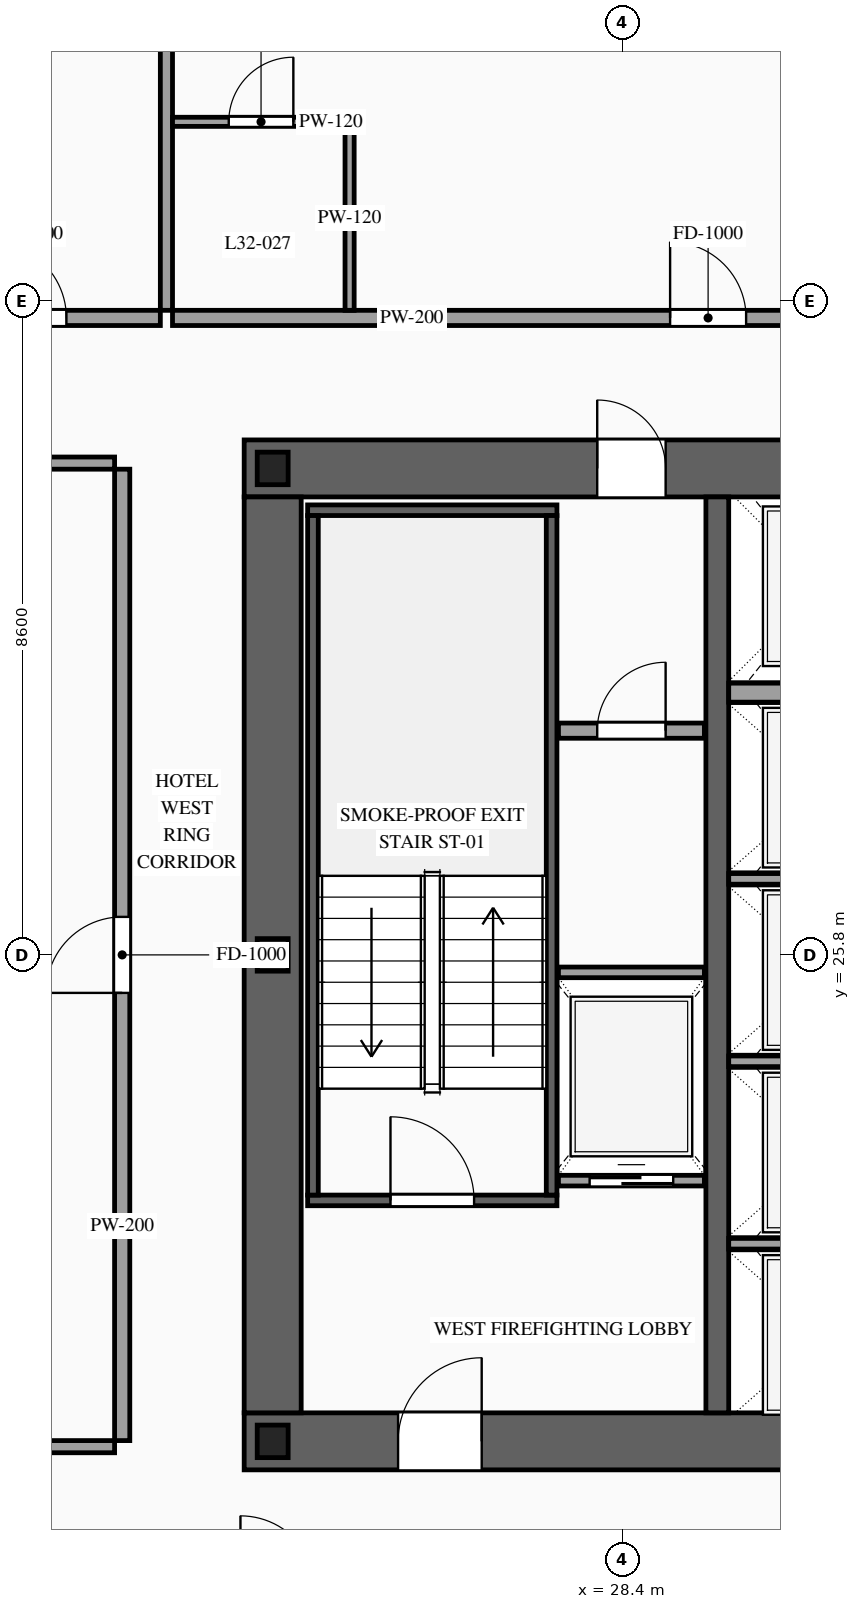
"""IFC4 building model, lengths in metres.
Left out: names, types, materials, properties, quantities, classifications, styles, units other than length and angle.
Written with IfcOpenShell. Run it as: python <this file> out.ifc"""

import sys

from ifc_helpers import new_model, si_unit, direction, frame, frame_2d, origin, origin_2d, place, context, subcontext, project, spatial, rectangle, i_section, extrude, source, transform, mapped, element, fill, save


model = new_model("IFC4")
c1 = context("Model", 3, precision=1e-05, world=origin(), true_north=direction((0.0, 1.0)))
c2 = subcontext(c1, "Body", "Model", "MODEL_VIEW")
j1 = project(units=[si_unit("LENGTHUNIT", "METRE"), si_unit("PLANEANGLEUNIT", "RADIAN")], contexts=[c1])
p1 = place(None, origin())
s1 = spatial("IfcSite", under=j1, at=p1, CompositionType="ELEMENT")
p2 = place(p1, origin())
s2 = spatial("IfcBuilding", under=s1, at=p2, CompositionType="ELEMENT")
p3 = place(p2, frame((0.0, 0.0, 122.6)))
s3 = spatial("IfcBuildingStorey", under=s2, at=p3, CompositionType="ELEMENT", Elevation=122.6)
p4 = place(p3, frame((23.425, 19.4, 0.0), z_axis=(0.0, 0.0, 1.0), x_axis=(1.0, 0.0, 0.0)))
e1 = element("IfcWall", 1, at=p4, inside=s3, PredefinedType="SHEAR", context=c2, shape_type="SweptSolid", body=[
    extrude(rectangle(XDim=27.15, YDim=0.75, at=frame_2d((13.575, 0.0))), origin(), (0.0, 0.0, 1.0), 3.6),
])
p5 = place(p4, frame((2.025, 0.0, 0.0)))
e2 = element("IfcOpeningElement", 2, at=p5, cuts=e1, PredefinedType="OPENING", context=c2, shape_type="SweptSolid", body=[
    extrude(rectangle(XDim=1.1, YDim=2.2, at=frame_2d((0.55, 1.1))), frame((0.0, 0.39, 0.0), z_axis=(0.0, -1.0, 0.0), x_axis=(1.0, 0.0, 0.0)), (0.0, 0.0, 1.0), 0.78),
])
p6 = place(p4, frame((9.925, 0.0, 0.0)))
e3 = element("IfcOpeningElement", 3, at=p6, cuts=e1, PredefinedType="OPENING", context=c2, shape_type="SweptSolid", body=[
    extrude(rectangle(XDim=1.1, YDim=2.2, at=frame_2d((0.55, 1.1))), frame((0.0, 0.39, 0.0), z_axis=(0.0, -1.0, 0.0), x_axis=(1.0, 0.0, 0.0)), (0.0, 0.0, 1.0), 0.78),
])
p7 = place(p4, frame((23.125, 0.0, 0.0)))
e4 = element("IfcOpeningElement", 4, at=p7, cuts=e1, PredefinedType="OPENING", context=c2, shape_type="SweptSolid", body=[
    extrude(rectangle(XDim=1.1, YDim=2.2, at=frame_2d((0.55, 1.1))), frame((0.0, 0.39, 0.0), z_axis=(0.0, -1.0, 0.0), x_axis=(1.0, 0.0, 0.0)), (0.0, 0.0, 1.0), 0.78),
])
p8 = place(p4, frame((19.745, 0.0, 0.0)))
e5 = element("IfcOpeningElement", 5, at=p8, cuts=e1, PredefinedType="OPENING", context=c2, shape_type="SweptSolid", body=[
    extrude(rectangle(XDim=0.9, YDim=2.15, at=frame_2d((0.45, 1.075))), frame((0.0, 0.39, 0.0), z_axis=(0.0, -1.0, 0.0), x_axis=(1.0, 0.0, 0.0)), (0.0, 0.0, 1.0), 0.78),
])
p9 = place(p4, frame((18.305, 0.0, 0.0)))
e6 = element("IfcOpeningElement", 6, at=p9, cuts=e1, PredefinedType="OPENING", context=c2, shape_type="SweptSolid", body=[
    extrude(rectangle(XDim=0.9, YDim=2.15, at=frame_2d((0.45, 1.075))), frame((0.0, 0.39, 0.0), z_axis=(0.0, -1.0, 0.0), x_axis=(1.0, 0.0, 0.0)), (0.0, 0.0, 1.0), 0.78),
])
p10 = place(p3, frame((23.425, 32.2, 0.0), z_axis=(0.0, 0.0, 1.0), x_axis=(1.0, 0.0, 0.0)))
e7 = element("IfcWall", 7, at=p10, inside=s3, PredefinedType="SHEAR", context=c2, shape_type="SweptSolid", body=[
    extrude(rectangle(XDim=27.15, YDim=0.75, at=frame_2d((13.575, 0.0))), origin(), (0.0, 0.0, 1.0), 3.6),
])
p11 = place(p10, frame((4.645, 0.0, 0.0)))
e8 = element("IfcOpeningElement", 8, at=p11, cuts=e7, PredefinedType="OPENING", context=c2, shape_type="SweptSolid", body=[
    extrude(rectangle(XDim=0.9, YDim=2.15, at=frame_2d((0.45, 1.075))), frame((0.0, 0.39, 0.0), z_axis=(0.0, -1.0, 0.0), x_axis=(1.0, 0.0, 0.0)), (0.0, 0.0, 1.0), 0.78),
])
p12 = place(p10, frame((9.925, 0.0, 0.0)))
e9 = element("IfcOpeningElement", 9, at=p12, cuts=e7, PredefinedType="OPENING", context=c2, shape_type="SweptSolid", body=[
    extrude(rectangle(XDim=1.1, YDim=2.2, at=frame_2d((0.55, 1.1))), frame((0.0, 0.39, 0.0), z_axis=(0.0, -1.0, 0.0), x_axis=(1.0, 0.0, 0.0)), (0.0, 0.0, 1.0), 0.78),
])
p13 = place(p10, frame((15.775, 0.0, 0.0)))
e10 = element("IfcOpeningElement", 10, at=p13, cuts=e7, PredefinedType="OPENING", context=c2, shape_type="SweptSolid", body=[
    extrude(rectangle(XDim=1.1, YDim=2.2, at=frame_2d((0.55, 1.1))), frame((0.0, 0.39, 0.0), z_axis=(0.0, -1.0, 0.0), x_axis=(1.0, 0.0, 0.0)), (0.0, 0.0, 1.0), 0.78),
])
m1 = source(origin(), c2, "Body", "SweptSolid", [
    extrude(rectangle(XDim=12.05, YDim=0.75, at=frame_2d((6.025, 0.0))), origin(), (0.0, 0.0, 1.0), 3.6),
])
p14 = place(p3, frame((23.8, 19.775, 0.0), z_axis=(0.0, 0.0, 1.0), x_axis=(0.0, 1.0, 0.0)))
e11 = element("IfcWall", 11, at=p14, inside=s3, PredefinedType="SHEAR", context=c2, shape_type="MappedRepresentation", body=[
    mapped(m1, transform((0.0, 0.0, 0.0), scale=1.0)),
])
m2 = source(origin(), c2, "Body", "SweptSolid", [
    extrude(rectangle(XDim=12.05, YDim=0.3, at=frame_2d((6.025, 0.0))), origin(), (0.0, 0.0, 1.0), 3.6),
])
p15 = place(p3, frame((29.65, 19.775, 0.0), z_axis=(0.0, 0.0, 1.0), x_axis=(0.0, 1.0, 0.0)))
e12 = element("IfcWall", 12, at=p15, inside=s3, PredefinedType="SOLIDWALL", context=c2, shape_type="MappedRepresentation", body=[
    mapped(m2, transform((0.0, 0.0, 0.0), scale=1.0)),
])
m3 = source(origin(), c2, "Body", "SweptSolid", [
    extrude(i_section(OverallWidth=0.407, OverallDepth=0.428, WebThickness=0.02, FlangeThickness=0.035, at=origin_2d()), origin(), (0.0, 0.0, 1.0), 3.6),
])
for number, where, z_axis, x_axis in (
    (13, (23.8, 19.4, 0.0), (0.0, 0.0, 1.0), (1.0, 0.0, 0.0)),
    (14, (23.8, 25.8, 0.0), (0.0, 0.0, 1.0), (1.0, 0.0, 0.0)),
    (15, (23.8, 32.2, 0.0), (0.0, 0.0, 1.0), (1.0, 0.0, 0.0)),
):
    element("IfcColumn", number, at=place(p3, frame(where, z_axis=z_axis, x_axis=x_axis)), inside=s3, PredefinedType="COLUMN", context=c2, shape_type="MappedRepresentation", body=[
        mapped(m3, transform((0.0, 0.0, 0.0), scale=1.0)),
    ])
p16 = place(p3, frame((27.56, 22.83, 0.0), z_axis=(0.0, 0.0, 1.0), x_axis=(1.0, 0.0, 0.0)))
e16 = element("IfcWall", 16, at=p16, inside=s3, PredefinedType="SOLIDWALL", context=c2, shape_type="SweptSolid", body=[
    extrude(rectangle(XDim=1.92, YDim=0.14, at=frame_2d((0.96, 0.0))), origin(), (0.0, 0.0, 1.0), 3.38),
])
p17 = place(p16, frame((0.41, 0.0, 0.0)))
e17 = element("IfcOpeningElement", 17, at=p17, cuts=e16, PredefinedType="OPENING", context=c2, shape_type="SweptSolid", body=[
    extrude(rectangle(XDim=1.1, YDim=2.2, at=frame_2d((0.55, 1.1))), frame((0.0, 0.085, 0.0), z_axis=(0.0, -1.0, 0.0), x_axis=(1.0, 0.0, 0.0)), (0.0, 0.0, 1.0), 0.17),
])
m4 = source(origin(), c2, "Body", "SweptSolid", [
    extrude(rectangle(XDim=1.92, YDim=0.14, at=frame_2d((0.96, 0.0))), origin(), (0.0, 0.0, 1.0), 3.38),
])
p18 = place(p3, frame((27.56, 25.57, 0.0), z_axis=(0.0, 0.0, 1.0), x_axis=(1.0, 0.0, 0.0)))
e18 = element("IfcWall", 18, at=p18, inside=s3, PredefinedType="SOLIDWALL", context=c2, shape_type="MappedRepresentation", body=[
    mapped(m4, transform((0.0, 0.0, 0.0), scale=1.0)),
])
m5 = source(origin(), c2, "Body", "SweptSolid", [
    extrude(rectangle(XDim=2.5, YDim=0.14, at=frame_2d((1.25, 0.0))), origin(), (0.0, 0.0, 1.0), 3.38),
])
for number, where, z_axis, x_axis in (
    (19, (29.8, 22.0, 0.0), (0.0, 0.0, 1.0), (1.0, 0.0, 0.0)),
    (20, (29.8, 24.4, 0.0), (0.0, 0.0, 1.0), (1.0, 0.0, 0.0)),
    (21, (29.8, 26.8, 0.0), (0.0, 0.0, 1.0), (1.0, 0.0, 0.0)),
):
    element("IfcWall", number, at=place(p3, frame(where, z_axis=z_axis, x_axis=x_axis)), inside=s3, PredefinedType="SOLIDWALL", context=c2, shape_type="MappedRepresentation", body=[
        mapped(m5, transform((0.0, 0.0, 0.0), scale=1.0)),
    ])
m6 = source(origin(), c2, "Body", "SweptSolid", [
    extrude(rectangle(XDim=2.5, YDim=0.25, at=frame_2d((1.25, 0.0))), origin(), (0.0, 0.0, 1.0), 3.38),
])
p19 = place(p3, frame((29.8, 29.25, 0.0), z_axis=(0.0, 0.0, 1.0), x_axis=(1.0, 0.0, 0.0)))
e22 = element("IfcWall", 22, at=p19, inside=s3, PredefinedType="SOLIDWALL", context=c2, shape_type="MappedRepresentation", body=[
    mapped(m6, transform((0.0, 0.0, 0.0), scale=1.0)),
])
p20 = place(p3, frame((24.26, 22.57, 0.0), z_axis=(0.0, 0.0, 1.0), x_axis=(1.0, 0.0, 0.0)))
e23 = element("IfcWall", 23, at=p20, inside=s3, PredefinedType="SOLIDWALL", context=c2, shape_type="SweptSolid", body=[
    extrude(rectangle(XDim=3.28, YDim=0.14, at=frame_2d((1.64, 0.0))), origin(), (0.0, 0.0, 1.0), 3.38),
])
p21 = place(p20, frame((1.09, 0.0, 0.0)))
e24 = element("IfcOpeningElement", 24, at=p21, cuts=e23, PredefinedType="OPENING", context=c2, shape_type="SweptSolid", body=[
    extrude(rectangle(XDim=1.1, YDim=2.2, at=frame_2d((0.55, 1.1))), frame((0.0, 0.085, 0.0), z_axis=(0.0, -1.0, 0.0), x_axis=(1.0, 0.0, 0.0)), (0.0, 0.0, 1.0), 0.17),
])
m7 = source(origin(), c2, "Body", "SweptSolid", [
    extrude(rectangle(XDim=3.28, YDim=0.14, at=frame_2d((1.64, 0.0))), origin(), (0.0, 0.0, 1.0), 3.38),
])
p22 = place(p3, frame((24.26, 31.65, 0.0), z_axis=(0.0, 0.0, 1.0), x_axis=(1.0, 0.0, 0.0)))
e25 = element("IfcWall", 25, at=p22, inside=s3, PredefinedType="SOLIDWALL", context=c2, shape_type="MappedRepresentation", body=[
    mapped(m7, transform((0.0, 0.0, 0.0), scale=1.0)),
])
m8 = source(origin(), c2, "Body", "SweptSolid", [
    extrude(rectangle(XDim=8.94, YDim=0.14, at=frame_2d((4.47, 0.0))), origin(), (0.0, 0.0, 1.0), 3.38),
])
for number, where, z_axis, x_axis in (
    (26, (24.33, 22.64, 0.0), (0.0, 0.0, 1.0), (0.0, 1.0, 0.0)),
    (27, (27.47, 22.64, 0.0), (0.0, 0.0, 1.0), (0.0, 1.0, 0.0)),
):
    element("IfcWall", number, at=place(p3, frame(where, z_axis=z_axis, x_axis=x_axis)), inside=s3, PredefinedType="SOLIDWALL", context=c2, shape_type="MappedRepresentation", body=[
        mapped(m8, transform((0.0, 0.0, 0.0), scale=1.0)),
    ])
p23 = place(p3, frame((27.56, 28.75, 0.0), z_axis=(0.0, 0.0, 1.0), x_axis=(1.0, 0.0, 0.0)))
e28 = element("IfcWall", 28, at=p23, inside=s3, PredefinedType="PARTITIONING", context=c2, shape_type="SweptSolid", body=[
    extrude(rectangle(XDim=1.92, YDim=0.2, at=frame_2d((0.96, 0.0))), origin(), (0.0, 0.0, 1.0), 3.38),
])
p24 = place(p23, frame((0.51, 0.0, 0.0)))
e29 = element("IfcOpeningElement", 29, at=p24, cuts=e28, PredefinedType="OPENING", context=c2, shape_type="SweptSolid", body=[
    extrude(rectangle(XDim=0.9, YDim=2.15, at=frame_2d((0.45, 1.075))), frame((0.0, 0.115, 0.0), z_axis=(0.0, -1.0, 0.0), x_axis=(1.0, 0.0, 0.0)), (0.0, 0.0, 1.0), 0.23),
])
p25 = place(p3, frame((16.44, 34.18, 0.0), z_axis=(0.0, 0.0, 1.0), x_axis=(1.0, 0.0, 0.0)))
e30 = element("IfcWall", 30, at=p25, inside=s3, PredefinedType="PARTITIONING", context=c2, shape_type="SweptSolid", body=[
    extrude(rectangle(XDim=5.882, YDim=0.2, at=frame_2d((2.941, 0.0))), origin(), (0.0, 0.0, 1.0), 3.38),
])
p26 = place(p25, frame((3.646, 0.0, 0.0)))
e31 = element("IfcOpeningElement", 31, at=p26, cuts=e30, PredefinedType="OPENING", context=c2, shape_type="SweptSolid", body=[
    extrude(rectangle(XDim=1.0, YDim=2.2, at=frame_2d((0.5, 1.1))), frame((0.0, 0.115, 0.0), z_axis=(0.0, -1.0, 0.0), x_axis=(1.0, 0.0, 0.0)), (0.0, 0.0, 1.0), 0.23),
])
m9 = source(origin(), c2, "Body", "SweptSolid", [
    extrude(rectangle(XDim=14.97, YDim=0.16, at=frame_2d((7.485, 0.0))), origin(), (0.0, 0.0, 1.0), 3.38),
])
p27 = place(p3, frame((22.402, 34.28, 0.0), z_axis=(0.0, 0.0, 1.0), x_axis=(0.0, 1.0, 0.0)))
e32 = element("IfcWall", 32, at=p27, inside=s3, PredefinedType="PARTITIONING", context=c2, shape_type="MappedRepresentation", body=[
    mapped(m9, transform((0.0, 0.0, 0.0), scale=1.0)),
])
p28 = place(p3, frame((22.482, 34.18, 0.0), z_axis=(0.0, 0.0, 1.0), x_axis=(1.0, 0.0, 0.0)))
e33 = element("IfcWall", 33, at=p28, inside=s3, PredefinedType="PARTITIONING", context=c2, shape_type="SweptSolid", body=[
    extrude(rectangle(XDim=11.683, YDim=0.2, at=frame_2d((5.842, 0.0))), origin(), (0.0, 0.0, 1.0), 3.38),
])
p29 = place(p28, frame((6.547, 0.0, 0.0)))
e34 = element("IfcOpeningElement", 34, at=p29, cuts=e33, PredefinedType="OPENING", context=c2, shape_type="SweptSolid", body=[
    extrude(rectangle(XDim=1.0, YDim=2.2, at=frame_2d((0.5, 1.1))), frame((0.0, 0.115, 0.0), z_axis=(0.0, -1.0, 0.0), x_axis=(1.0, 0.0, 0.0)), (0.0, 0.0, 1.0), 0.23),
])
p30 = place(p3, frame((22.482, 36.76, 0.0), z_axis=(0.0, 0.0, 1.0), x_axis=(1.0, 0.0, 0.0)))
e35 = element("IfcWall", 35, at=p30, inside=s3, PredefinedType="PARTITIONING", context=c2, shape_type="SweptSolid", body=[
    extrude(rectangle(XDim=2.33, YDim=0.12, at=frame_2d((1.165, 0.0))), origin(), (0.0, 0.0, 1.0), 3.38),
])
p31 = place(p30, frame((0.74, 0.0, 0.0)))
e36 = element("IfcOpeningElement", 36, at=p31, cuts=e35, PredefinedType="OPENING", context=c2, shape_type="SweptSolid", body=[
    extrude(rectangle(XDim=0.85, YDim=2.1, at=frame_2d((0.425, 1.05))), frame((0.0, 0.075, 0.0), z_axis=(0.0, -1.0, 0.0), x_axis=(1.0, 0.0, 0.0)), (0.0, 0.0, 1.0), 0.15),
])
m10 = source(origin(), c2, "Body", "SweptSolid", [
    extrude(rectangle(XDim=2.42, YDim=0.12, at=frame_2d((1.21, 0.0))), origin(), (0.0, 0.0, 1.0), 3.38),
])
p32 = place(p3, frame((24.812, 34.28, 0.0), z_axis=(0.0, 0.0, 1.0), x_axis=(0.0, 1.0, 0.0)))
e37 = element("IfcWall", 37, at=p32, inside=s3, PredefinedType="PARTITIONING", context=c2, shape_type="MappedRepresentation", body=[
    mapped(m10, transform((0.0, 0.0, 0.0), scale=1.0)),
])
p33 = place(p3, frame((21.82, 19.41, 0.0), z_axis=(0.0, 0.0, 1.0), x_axis=(0.0, 1.0, 0.0)))
e38 = element("IfcWall", 38, at=p33, inside=s3, PredefinedType="PARTITIONING", context=c2, shape_type="SweptSolid", body=[
    extrude(rectangle(XDim=12.78, YDim=0.2, at=frame_2d((6.39, 0.0))), origin(), (0.0, 0.0, 1.0), 3.38),
])
p34 = place(p33, frame((5.89, 0.0, 0.0)))
e39 = element("IfcOpeningElement", 39, at=p34, cuts=e38, PredefinedType="OPENING", context=c2, shape_type="SweptSolid", body=[
    extrude(rectangle(XDim=1.0, YDim=2.2, at=frame_2d((0.5, 1.1))), frame((0.0, 0.115, 0.0), z_axis=(0.0, -1.0, 0.0), x_axis=(1.0, 0.0, 0.0)), (0.0, 0.0, 1.0), 0.23),
])
m11 = source(origin(), c2, "Body", "SweptSolid", [
    extrude(rectangle(XDim=8.17, YDim=0.16, at=frame_2d((4.085, 0.0))), origin(), (0.0, 0.0, 1.0), 2.875),
])
for number, where, z_axis, x_axis in (
    (40, (13.55, 19.33, 0.0), (0.0, 0.0, 1.0), (1.0, 0.0, 0.0)),
    (41, (13.55, 32.27, 0.0), (0.0, 0.0, 1.0), (1.0, 0.0, 0.0)),
):
    element("IfcWall", number, at=place(p3, frame(where, z_axis=z_axis, x_axis=x_axis)), inside=s3, PredefinedType="PARTITIONING", context=c2, shape_type="MappedRepresentation", body=[
        mapped(m11, transform((0.0, 0.0, 0.0), scale=1.0)),
    ])
m12 = source(origin(), c2, "Body", "SweptSolid", [
    extrude(rectangle(XDim=1.1, YDim=2.2, at=frame_2d((0.55, 1.1))), frame((0.0, 0.025, 0.0), z_axis=(0.0, -1.0, 0.0), x_axis=(1.0, 0.0, 0.0)), (0.0, 0.0, 1.0), 0.05),
])
p35 = place(p17, origin())
e42 = element("IfcDoor", 42, at=p35, inside=s3, OperationType="SLIDING_TO_LEFT", PredefinedType="DOOR", context=c2, shape_type="MappedRepresentation", body=[
    mapped(m12, transform((0.0, 0.0, 0.0), scale=1.0)),
])
fill(e17, e42)
m13 = source(origin(), c2, "Body", "SweptSolid", [
    extrude(rectangle(XDim=1.1, YDim=2.2, at=frame_2d((0.55, 1.1))), frame((0.0, 0.025, 0.0), z_axis=(0.0, -1.0, 0.0), x_axis=(1.0, 0.0, 0.0)), (0.0, 0.0, 1.0), 0.05),
])
p36 = place(p21, origin())
e43 = element("IfcDoor", 43, at=p36, inside=s3, OperationType="SINGLE_SWING_LEFT", PredefinedType="DOOR", context=c2, shape_type="MappedRepresentation", body=[
    mapped(m13, transform((0.0, 0.0, 0.0), scale=1.0)),
])
fill(e24, e43)
p37 = place(p5, origin())
e44 = element("IfcDoor", 44, at=p37, inside=s3, OperationType="SINGLE_SWING_RIGHT", PredefinedType="DOOR", context=c2, shape_type="MappedRepresentation", body=[
    mapped(m13, transform((0.0, 0.0, 0.0), scale=1.0)),
])
fill(e2, e44)
m14 = source(origin(), c2, "Body", "SweptSolid", [
    extrude(rectangle(XDim=0.9, YDim=2.15, at=frame_2d((0.45, 1.075))), frame((0.0, 0.025, 0.0), z_axis=(0.0, -1.0, 0.0), x_axis=(1.0, 0.0, 0.0)), (0.0, 0.0, 1.0), 0.05),
])
p38 = place(p11, origin())
e45 = element("IfcDoor", 45, at=p38, inside=s3, OperationType="SINGLE_SWING_LEFT", PredefinedType="DOOR", context=c2, shape_type="MappedRepresentation", body=[
    mapped(m14, transform((0.0, 0.0, 0.0), scale=1.0)),
])
fill(e8, e45)
p39 = place(p24, origin())
e46 = element("IfcDoor", 46, at=p39, inside=s3, OperationType="SINGLE_SWING_RIGHT", PredefinedType="DOOR", context=c2, shape_type="MappedRepresentation", body=[
    mapped(m14, transform((0.0, 0.0, 0.0), scale=1.0)),
])
fill(e29, e46)
m15 = source(origin(), c2, "Body", "SweptSolid", [
    extrude(rectangle(XDim=1.0, YDim=2.2, at=frame_2d((0.5, 1.1))), frame((0.0, 0.025, 0.0), z_axis=(0.0, -1.0, 0.0), x_axis=(1.0, 0.0, 0.0)), (0.0, 0.0, 1.0), 0.05),
])
p40 = place(p26, origin())
e47 = element("IfcDoor", 47, at=p40, inside=s3, OperationType="SINGLE_SWING_LEFT", PredefinedType="DOOR", context=c2, shape_type="MappedRepresentation", body=[
    mapped(m15, transform((0.0, 0.0, 0.0), scale=1.0)),
])
fill(e31, e47)
p41 = place(p29, origin())
e48 = element("IfcDoor", 48, at=p41, inside=s3, OperationType="SINGLE_SWING_LEFT", PredefinedType="DOOR", context=c2, shape_type="MappedRepresentation", body=[
    mapped(m15, transform((0.0, 0.0, 0.0), scale=1.0)),
])
fill(e34, e48)
m16 = source(origin(), c2, "Body", "SweptSolid", [
    extrude(rectangle(XDim=0.85, YDim=2.1, at=frame_2d((0.425, 1.05))), frame((0.0, 0.025, 0.0), z_axis=(0.0, -1.0, 0.0), x_axis=(1.0, 0.0, 0.0)), (0.0, 0.0, 1.0), 0.05),
])
p42 = place(p31, origin())
e49 = element("IfcDoor", 49, at=p42, inside=s3, OperationType="SINGLE_SWING_RIGHT", PredefinedType="DOOR", context=c2, shape_type="MappedRepresentation", body=[
    mapped(m16, transform((0.0, 0.0, 0.0), scale=1.0)),
])
fill(e36, e49)
p43 = place(p34, origin())
e50 = element("IfcDoor", 50, at=p43, inside=s3, OperationType="SINGLE_SWING_LEFT", PredefinedType="DOOR", context=c2, shape_type="MappedRepresentation", body=[
    mapped(m15, transform((0.0, 0.0, 0.0), scale=1.0)),
])
fill(e39, e50)
save(model, sys.argv[1])
